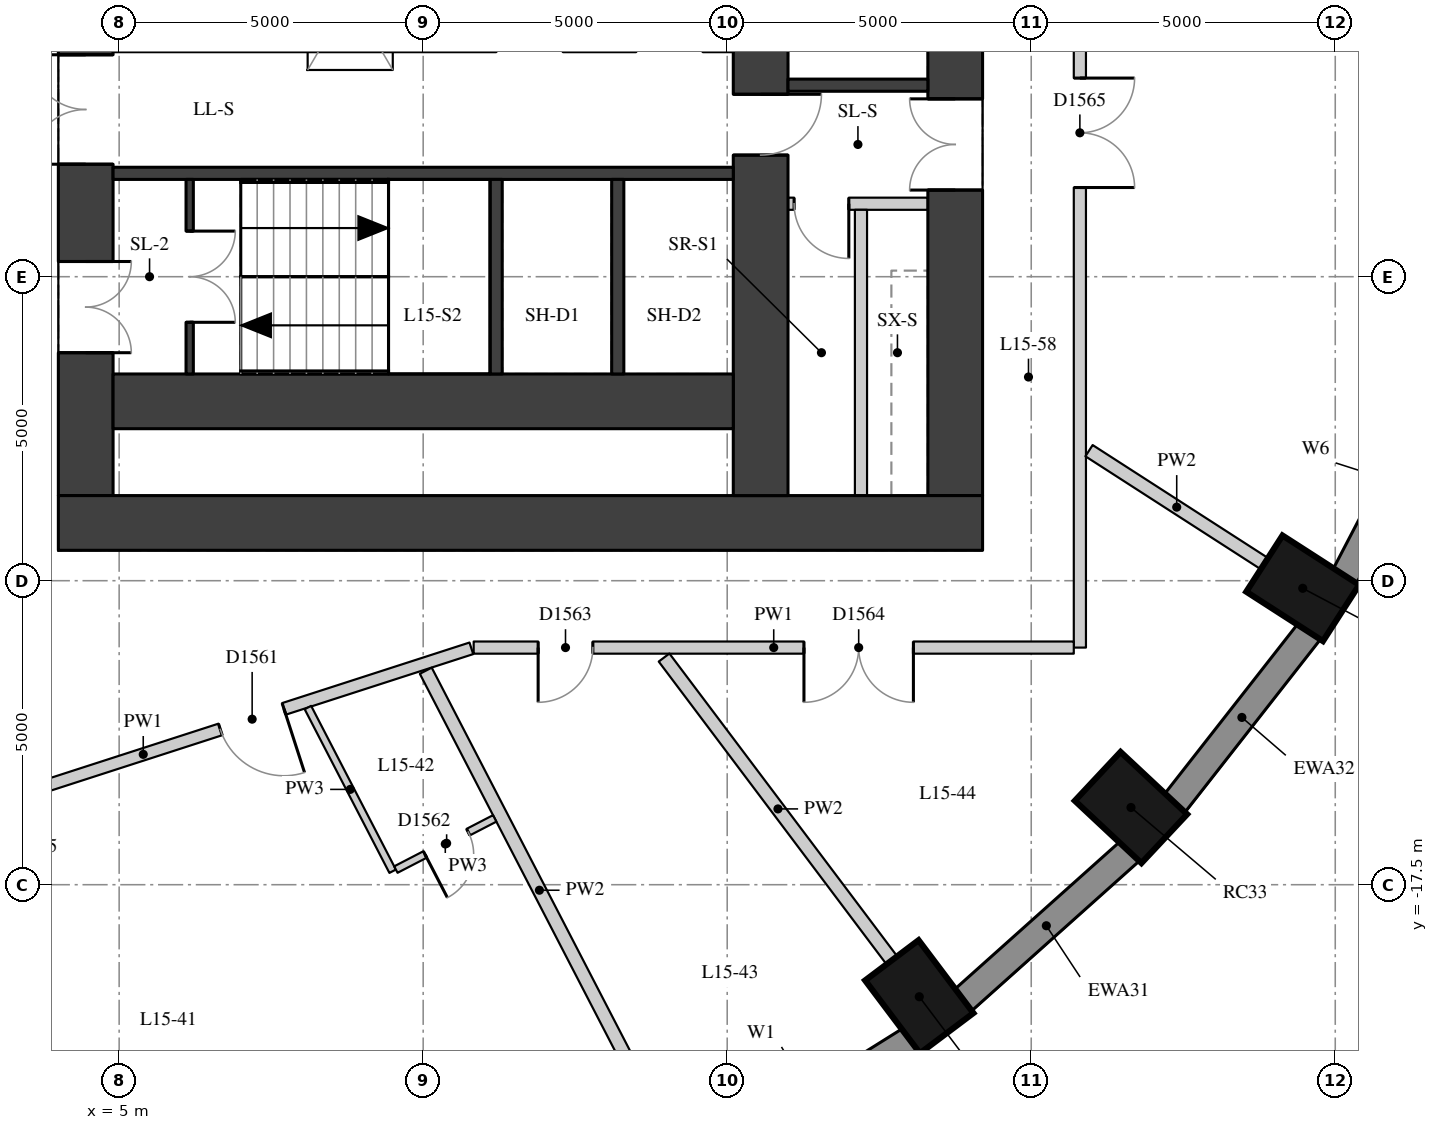
"""IFC4 building model, lengths in metres.
Left out: names, types, materials, properties, quantities, classifications, styles, units other than length and angle.
Written with IfcOpenShell. Run it as: python <this file> out.ifc"""

import sys

from ifc_helpers import new_model, si_unit, direction, frame, frame_2d, origin, origin_2d, place, context, subcontext, project, spatial, rectangle, extrude, element, fill, save


model = new_model("IFC4")
c1 = context("Model", 3, precision=1e-05, world=origin(), true_north=direction((0.0, 1.0)))
c2 = subcontext(c1, "Body", "Model", "MODEL_VIEW")
j1 = project(units=[si_unit("LENGTHUNIT", "METRE"), si_unit("PLANEANGLEUNIT", "RADIAN")], contexts=[c1])
p1 = place(None, origin())
s1 = spatial("IfcSite", under=j1, at=p1, CompositionType="ELEMENT")
p2 = place(p1, origin())
s2 = spatial("IfcBuilding", under=s1, at=p2, CompositionType="ELEMENT")
p3 = place(p2, frame((0.0, 0.0, 58.0)))
s3 = spatial("IfcBuildingStorey", under=s2, at=p3, CompositionType="ELEMENT", Elevation=58.0)
for number, where, z_axis, x_axis in (
    (1, (18.159, -19.343, 0.0), (0.0, 0.0, 1.0), (0.601, -0.799, 0.0)),
    (2, (21.641, -16.23, 0.0), (0.0, 0.0, 1.0), (0.73, -0.683, 0.0)),
    (3, (24.465, -12.625, 0.0), (0.0, 0.0, 1.0), (0.841, -0.541, 0.0)),
):
    element("IfcColumn", number, at=place(p3, frame(where, z_axis=z_axis, x_axis=x_axis)), inside=s3, PredefinedType="COLUMN", context=c2, shape_type="SweptSolid", body=[
        extrude(rectangle(XDim=1.5, YDim=1.1, at=origin_2d()), origin(), (0.0, 0.0, 1.0), 3.3),
    ])
p4 = place(p3, frame((14.817, -22.051, 0.0), z_axis=(0.0, 0.0, 1.0), x_axis=(0.847635480093, 0.530579016629, 0.0)))
e4 = element("IfcWall", 4, at=p4, inside=s3, PredefinedType="SOLIDWALL", context=c2, shape_type="SweptSolid", body=[
    extrude(rectangle(XDim=3.782, YDim=0.45, at=frame_2d((1.891, 0.0))), origin(), (0.0, 0.0, 1.0), 3.02),
])
p5 = place(p4, frame((0.791, 0.0, 0.4)))
e5 = element("IfcOpeningElement", 5, at=p5, cuts=e4, PredefinedType="OPENING", context=c2, shape_type="SweptSolid", body=[
    extrude(rectangle(XDim=2.2, YDim=1.75, at=frame_2d((1.1, 0.875))), frame((0.0, 0.235, 0.0), z_axis=(0.0, -1.0, 0.0), x_axis=(1.0, 0.0, 0.0)), (0.0, 0.0, 1.0), 0.47),
])
p6 = place(p3, frame((18.871, -19.407, 0.0), z_axis=(0.0, 0.0, 1.0), x_axis=(0.745526233716, 0.66647628228, 0.0)))
e6 = element("IfcWall", 6, at=p6, inside=s3, PredefinedType="SOLIDWALL", context=c2, shape_type="SweptSolid", body=[
    extrude(rectangle(XDim=3.697, YDim=0.45, at=frame_2d((1.848, 0.0))), origin(), (0.0, 0.0, 1.0), 3.02),
])
p7 = place(p3, frame((22.352, -16.17, 0.0), z_axis=(0.0, 0.0, 1.0), x_axis=(0.616661975264, 0.787228053529, 0.0)))
e7 = element("IfcWall", 7, at=p7, inside=s3, PredefinedType="SOLIDWALL", context=c2, shape_type="SweptSolid", body=[
    extrude(rectangle(XDim=3.61, YDim=0.45, at=frame_2d((1.805, 0.0))), origin(), (0.0, 0.0, 1.0), 3.02),
])
p8 = place(p3, frame((25.152, -12.437, 0.0), z_axis=(0.0, 0.0, 1.0), x_axis=(0.462492775226, 0.886623050041, 0.0)))
e8 = element("IfcWall", 8, at=p8, inside=s3, PredefinedType="SOLIDWALL", context=c2, shape_type="SweptSolid", body=[
    extrude(rectangle(XDim=3.532, YDim=0.45, at=frame_2d((1.766, 0.0))), origin(), (0.0, 0.0, 1.0), 3.02),
])
p9 = place(p8, frame((1.466, 0.0, 0.4)))
e9 = element("IfcOpeningElement", 9, at=p9, cuts=e8, PredefinedType="OPENING", context=c2, shape_type="SweptSolid", body=[
    extrude(rectangle(XDim=0.6, YDim=1.75, at=frame_2d((0.3, 0.875))), frame((0.0, 0.235, 0.0), z_axis=(0.0, -1.0, 0.0), x_axis=(1.0, 0.0, 0.0)), (0.0, 0.0, 1.0), 0.47),
])
p10 = place(p3, frame((4.45, -11.1, 0.0), z_axis=(0.0, 0.0, 1.0), x_axis=(0.0, 1.0, 0.0)))
e10 = element("IfcWall", 10, at=p10, inside=s3, PredefinedType="SHEAR", context=c2, shape_type="SweptSolid", body=[
    extrude(rectangle(XDim=22.2, YDim=0.9, at=frame_2d((11.1, 0.0))), origin(), (0.0, 0.0, 1.0), 3.02),
])
p11 = place(p10, frame((2.35, 0.0, 0.0)))
e11 = element("IfcOpeningElement", 11, at=p11, cuts=e10, PredefinedType="OPENING", context=c2, shape_type="SweptSolid", body=[
    extrude(rectangle(XDim=1.5, YDim=2.1, at=frame_2d((0.75, 1.05))), frame((0.0, 0.46, 0.0), z_axis=(0.0, -1.0, 0.0), x_axis=(1.0, 0.0, 0.0)), (0.0, 0.0, 1.0), 0.92),
])
p12 = place(p10, frame((5.45, 0.0, 0.0)))
e12 = element("IfcOpeningElement", 12, at=p12, cuts=e10, PredefinedType="OPENING", context=c2, shape_type="SweptSolid", body=[
    extrude(rectangle(XDim=1.8, YDim=2.1, at=frame_2d((0.9, 1.05))), frame((0.0, 0.46, 0.0), z_axis=(0.0, -1.0, 0.0), x_axis=(1.0, 0.0, 0.0)), (0.0, 0.0, 1.0), 0.92),
])
p13 = place(p10, frame((7.95, 0.0, 0.0)))
e13 = element("IfcOpeningElement", 13, at=p13, cuts=e10, PredefinedType="OPENING", context=c2, shape_type="SweptSolid", body=[
    extrude(rectangle(XDim=1.1, YDim=2.1, at=frame_2d((0.55, 1.05))), frame((0.0, 0.46, 0.0), z_axis=(0.0, -1.0, 0.0), x_axis=(1.0, 0.0, 0.0)), (0.0, 0.0, 1.0), 0.92),
])
p14 = place(p10, frame((10.6, 0.0, 0.0)))
e14 = element("IfcOpeningElement", 14, at=p14, cuts=e10, PredefinedType="OPENING", context=c2, shape_type="SweptSolid", body=[
    extrude(rectangle(XDim=1.0, YDim=2.1, at=frame_2d((0.5, 1.05))), frame((0.0, 0.46, 0.0), z_axis=(0.0, -1.0, 0.0), x_axis=(1.0, 0.0, 0.0)), (0.0, 0.0, 1.0), 0.92),
])
p15 = place(p10, frame((13.15, 0.0, 0.0)))
e15 = element("IfcOpeningElement", 15, at=p15, cuts=e10, PredefinedType="OPENING", context=c2, shape_type="SweptSolid", body=[
    extrude(rectangle(XDim=1.1, YDim=2.1, at=frame_2d((0.55, 1.05))), frame((0.0, 0.46, 0.0), z_axis=(0.0, -1.0, 0.0), x_axis=(1.0, 0.0, 0.0)), (0.0, 0.0, 1.0), 0.92),
])
p16 = place(p10, frame((14.95, 0.0, 0.0)))
e16 = element("IfcOpeningElement", 16, at=p16, cuts=e10, PredefinedType="OPENING", context=c2, shape_type="SweptSolid", body=[
    extrude(rectangle(XDim=1.8, YDim=2.1, at=frame_2d((0.9, 1.05))), frame((0.0, 0.46, 0.0), z_axis=(0.0, -1.0, 0.0), x_axis=(1.0, 0.0, 0.0)), (0.0, 0.0, 1.0), 0.92),
])
p17 = place(p10, frame((18.35, 0.0, 0.0)))
e17 = element("IfcOpeningElement", 17, at=p17, cuts=e10, PredefinedType="OPENING", context=c2, shape_type="SweptSolid", body=[
    extrude(rectangle(XDim=1.5, YDim=2.1, at=frame_2d((0.75, 1.05))), frame((0.0, 0.46, 0.0), z_axis=(0.0, -1.0, 0.0), x_axis=(1.0, 0.0, 0.0)), (0.0, 0.0, 1.0), 0.92),
])
p18 = place(p3, frame((18.75, -11.1, 0.0), z_axis=(0.0, 0.0, 1.0), x_axis=(0.0, 1.0, 0.0)))
e18 = element("IfcWall", 18, at=p18, inside=s3, PredefinedType="SHEAR", context=c2, shape_type="SweptSolid", body=[
    extrude(rectangle(XDim=22.2, YDim=0.9, at=frame_2d((11.1, 0.0))), origin(), (0.0, 0.0, 1.0), 3.02),
])
p19 = place(p18, frame((16.175, 0.0, 0.0)))
e19 = element("IfcOpeningElement", 19, at=p19, cuts=e18, PredefinedType="OPENING", context=c2, shape_type="SweptSolid", body=[
    extrude(rectangle(XDim=1.5, YDim=2.1, at=frame_2d((0.75, 1.05))), frame((0.0, 0.46, 0.0), z_axis=(0.0, -1.0, 0.0), x_axis=(1.0, 0.0, 0.0)), (0.0, 0.0, 1.0), 0.92),
])
p20 = place(p18, frame((5.025, 0.0, 0.0)))
e20 = element("IfcOpeningElement", 20, at=p20, cuts=e18, PredefinedType="OPENING", context=c2, shape_type="SweptSolid", body=[
    extrude(rectangle(XDim=1.5, YDim=2.1, at=frame_2d((0.75, 1.05))), frame((0.0, 0.46, 0.0), z_axis=(0.0, -1.0, 0.0), x_axis=(1.0, 0.0, 0.0)), (0.0, 0.0, 1.0), 0.92),
])
p21 = place(p3, frame((4.0, -11.55, 0.0), z_axis=(0.0, 0.0, 1.0), x_axis=(1.0, 0.0, 0.0)))
e21 = element("IfcWall", 21, at=p21, inside=s3, PredefinedType="SHEAR", context=c2, shape_type="SweptSolid", body=[
    extrude(rectangle(XDim=15.2, YDim=0.9, at=frame_2d((7.6, 0.0))), origin(), (0.0, 0.0, 1.0), 3.02),
])
p22 = place(p3, frame((15.55, -11.1, 0.0), z_axis=(0.0, 0.0, 1.0), x_axis=(0.0, 1.0, 0.0)))
e22 = element("IfcWall", 22, at=p22, inside=s3, PredefinedType="SHEAR", context=c2, shape_type="SweptSolid", body=[
    extrude(rectangle(XDim=22.2, YDim=0.9, at=frame_2d((11.1, 0.0))), origin(), (0.0, 0.0, 1.0), 3.02),
])
p23 = place(p22, frame((15.6, 0.0, 0.0)))
e23 = element("IfcOpeningElement", 23, at=p23, cuts=e22, PredefinedType="OPENING", context=c2, shape_type="SweptSolid", body=[
    extrude(rectangle(XDim=1.0, YDim=2.1, at=frame_2d((0.5, 1.05))), frame((0.0, 0.46, 0.0), z_axis=(0.0, -1.0, 0.0), x_axis=(1.0, 0.0, 0.0)), (0.0, 0.0, 1.0), 0.92),
])
p24 = place(p22, frame((5.6, 0.0, 0.0)))
e24 = element("IfcOpeningElement", 24, at=p24, cuts=e22, PredefinedType="OPENING", context=c2, shape_type="SweptSolid", body=[
    extrude(rectangle(XDim=1.0, YDim=2.1, at=frame_2d((0.5, 1.05))), frame((0.0, 0.46, 0.0), z_axis=(0.0, -1.0, 0.0), x_axis=(1.0, 0.0, 0.0)), (0.0, 0.0, 1.0), 0.92),
])
p25 = place(p3, frame((4.9, -9.55, 0.0), z_axis=(0.0, 0.0, 1.0), x_axis=(1.0, 0.0, 0.0)))
e25 = element("IfcWall", 25, at=p25, inside=s3, PredefinedType="SHEAR", context=c2, shape_type="SweptSolid", body=[
    extrude(rectangle(XDim=10.2, YDim=0.9, at=frame_2d((5.1, 0.0))), origin(), (0.0, 0.0, 1.0), 3.02),
])
p26 = place(p3, frame((4.9, -5.8, 0.0), z_axis=(0.0, 0.0, 1.0), x_axis=(1.0, 0.0, 0.0)))
e26 = element("IfcWall", 26, at=p26, inside=s3, PredefinedType="SHEAR", context=c2, shape_type="SweptSolid", body=[
    extrude(rectangle(XDim=10.2, YDim=0.2, at=frame_2d((5.1, 0.0))), origin(), (0.0, 0.0, 1.0), 3.02),
])
for number, where, z_axis, x_axis in (
    (27, (11.2, -9.1, 0.0), (0.0, 0.0, 1.0), (0.0, 1.0, 0.0)),
    (28, (13.2, -9.1, 0.0), (0.0, 0.0, 1.0), (0.0, 1.0, 0.0)),
):
    element("IfcWall", number, at=place(p3, frame(where, z_axis=z_axis, x_axis=x_axis)), inside=s3, PredefinedType="SHEAR", context=c2, shape_type="SweptSolid", body=[
        extrude(rectangle(XDim=3.2, YDim=0.2, at=frame_2d((1.6, 0.0))), origin(), (0.0, 0.0, 1.0), 3.02),
    ])
p27 = place(p3, frame((6.16, -9.1, 0.0), z_axis=(0.0, 0.0, 1.0), x_axis=(0.0, 1.0, 0.0)))
e29 = element("IfcWall", 29, at=p27, inside=s3, PredefinedType="SHEAR", context=c2, shape_type="SweptSolid", body=[
    extrude(rectangle(XDim=3.2, YDim=0.12, at=frame_2d((1.6, 0.0))), origin(), (0.0, 0.0, 1.0), 3.02),
])
p28 = place(p27, frame((0.85, 0.0, 0.0)))
e30 = element("IfcOpeningElement", 30, at=p28, cuts=e29, PredefinedType="OPENING", context=c2, shape_type="SweptSolid", body=[
    extrude(rectangle(XDim=1.5, YDim=2.1, at=frame_2d((0.75, 1.05))), frame((0.0, 0.07, 0.0), z_axis=(0.0, -1.0, 0.0), x_axis=(1.0, 0.0, 0.0)), (0.0, 0.0, 1.0), 0.14),
])
p29 = place(p3, frame((16.0, -4.35, 0.0), z_axis=(0.0, 0.0, 1.0), x_axis=(1.0, 0.0, 0.0)))
e31 = element("IfcWall", 31, at=p29, inside=s3, PredefinedType="SHEAR", context=c2, shape_type="SweptSolid", body=[
    extrude(rectangle(XDim=2.3, YDim=0.2, at=frame_2d((1.15, 0.0))), origin(), (0.0, 0.0, 1.0), 3.02),
])
p30 = place(p3, frame((16.0, -6.3, 0.0), z_axis=(0.0, 0.0, 1.0), x_axis=(1.0, 0.0, 0.0)))
e32 = element("IfcWall", 32, at=p30, inside=s3, PredefinedType="PARTITIONING", context=c2, shape_type="SweptSolid", body=[
    extrude(rectangle(XDim=2.3, YDim=0.2, at=frame_2d((1.15, 0.0))), origin(), (0.0, 0.0, 1.0), 3.02),
])
p31 = place(p30, frame((0.1, 0.0, 0.0)))
e33 = element("IfcOpeningElement", 33, at=p31, cuts=e32, PredefinedType="OPENING", context=c2, shape_type="SweptSolid", body=[
    extrude(rectangle(XDim=0.9, YDim=2.1, at=frame_2d((0.45, 1.05))), frame((0.0, 0.11, 0.0), z_axis=(0.0, -1.0, 0.0), x_axis=(1.0, 0.0, 0.0)), (0.0, 0.0, 1.0), 0.22),
])
p32 = place(p3, frame((17.2, -11.1, 0.0), z_axis=(0.0, 0.0, 1.0), x_axis=(0.0, 1.0, 0.0)))
e34 = element("IfcWall", 34, at=p32, inside=s3, PredefinedType="PARTITIONING", context=c2, shape_type="SweptSolid", body=[
    extrude(rectangle(XDim=4.7, YDim=0.2, at=frame_2d((2.35, 0.0))), origin(), (0.0, 0.0, 1.0), 3.02),
])
p33 = place(p3, frame((20.8, 13.5, 0.0), z_axis=(0.0, 0.0, 1.0), x_axis=(0.0, -1.0, 0.0)))
e35 = element("IfcWall", 35, at=p33, inside=s3, PredefinedType="PARTITIONING", context=c2, shape_type="SweptSolid", body=[
    extrude(rectangle(XDim=27.1, YDim=0.2, at=frame_2d((13.55, 0.0))), origin(), (0.0, 0.0, 1.0), 3.02),
])
p34 = place(p33, frame((17.733, 0.0, 0.0)))
e36 = element("IfcOpeningElement", 36, at=p34, cuts=e35, PredefinedType="OPENING", context=c2, shape_type="SweptSolid", body=[
    extrude(rectangle(XDim=1.8, YDim=2.1, at=frame_2d((0.9, 1.05))), frame((0.0, 0.11, 0.0), z_axis=(0.0, -1.0, 0.0), x_axis=(1.0, 0.0, 0.0)), (0.0, 0.0, 1.0), 0.22),
])
p35 = place(p33, frame((9.448, 0.0, 0.0)))
e37 = element("IfcOpeningElement", 37, at=p35, cuts=e35, PredefinedType="OPENING", context=c2, shape_type="SweptSolid", body=[
    extrude(rectangle(XDim=1.8, YDim=2.1, at=frame_2d((0.9, 1.05))), frame((0.0, 0.11, 0.0), z_axis=(0.0, -1.0, 0.0), x_axis=(1.0, 0.0, 0.0)), (0.0, 0.0, 1.0), 0.22),
])
p36 = place(p33, frame((2.704, 0.0, 0.0)))
e38 = element("IfcOpeningElement", 38, at=p36, cuts=e35, PredefinedType="OPENING", context=c2, shape_type="SweptSolid", body=[
    extrude(rectangle(XDim=1.8, YDim=2.1, at=frame_2d((0.9, 1.05))), frame((0.0, 0.11, 0.0), z_axis=(0.0, -1.0, 0.0), x_axis=(1.0, 0.0, 0.0)), (0.0, 0.0, 1.0), 0.22),
])
p37 = place(p3, frame((20.7, -13.6, 0.0), z_axis=(0.0, 0.0, 1.0), x_axis=(-1.0, 0.0, 0.0)))
e39 = element("IfcWall", 39, at=p37, inside=s3, PredefinedType="PARTITIONING", context=c2, shape_type="SweptSolid", body=[
    extrude(rectangle(XDim=9.87, YDim=0.2, at=frame_2d((4.935, 0.0))), origin(), (0.0, 0.0, 1.0), 3.02),
])
p38 = place(p37, frame((7.909, 0.0, 0.0)))
e40 = element("IfcOpeningElement", 40, at=p38, cuts=e39, PredefinedType="OPENING", context=c2, shape_type="SweptSolid", body=[
    extrude(rectangle(XDim=0.9, YDim=2.1, at=frame_2d((0.45, 1.05))), frame((0.0, 0.11, 0.0), z_axis=(0.0, -1.0, 0.0), x_axis=(1.0, 0.0, 0.0)), (0.0, 0.0, 1.0), 0.22),
])
p39 = place(p37, frame((2.638, 0.0, 0.0)))
e41 = element("IfcOpeningElement", 41, at=p39, cuts=e39, PredefinedType="OPENING", context=c2, shape_type="SweptSolid", body=[
    extrude(rectangle(XDim=1.8, YDim=2.1, at=frame_2d((0.9, 1.05))), frame((0.0, 0.11, 0.0), z_axis=(0.0, -1.0, 0.0), x_axis=(1.0, 0.0, 0.0)), (0.0, 0.0, 1.0), 0.22),
])
p40 = place(p3, frame((10.792, -13.612, 0.0), z_axis=(0.0, 0.0, 1.0), x_axis=(-0.951542928403, -0.307515943336, 0.0)))
e42 = element("IfcWall", 42, at=p40, inside=s3, PredefinedType="PARTITIONING", context=c2, shape_type="SweptSolid", body=[
    extrude(rectangle(XDim=11.342, YDim=0.2, at=frame_2d((5.671, 0.0))), origin(), (0.0, 0.0, 1.0), 3.02),
])
p41 = place(p40, frame((3.239, 0.0, 0.0)))
e43 = element("IfcOpeningElement", 43, at=p41, cuts=e42, PredefinedType="OPENING", context=c2, shape_type="SweptSolid", body=[
    extrude(rectangle(XDim=1.1, YDim=2.1, at=frame_2d((0.55, 1.05))), frame((0.0, 0.11, 0.0), z_axis=(0.0, -1.0, 0.0), x_axis=(1.0, 0.0, 0.0)), (0.0, 0.0, 1.0), 0.22),
])
p42 = place(p3, frame((13.78, -21.201, 0.0), z_axis=(0.0, 0.0, 1.0), x_axis=(-0.459685115008, 0.888081975405, 0.0)))
e44 = element("IfcWall", 44, at=p42, inside=s3, PredefinedType="PARTITIONING", context=c2, shape_type="SweptSolid", body=[
    extrude(rectangle(XDim=8.131, YDim=0.22, at=frame_2d((4.065, 0.0))), origin(), (0.0, 0.0, 1.0), 3.02),
])
p43 = place(p3, frame((17.708, -18.743, 0.0), z_axis=(0.0, 0.0, 1.0), x_axis=(-0.601177883261, 0.799115231164, 0.0)))
e45 = element("IfcWall", 45, at=p43, inside=s3, PredefinedType="PARTITIONING", context=c2, shape_type="SweptSolid", body=[
    extrude(rectangle(XDim=6.231, YDim=0.22, at=frame_2d((3.116, 0.0))), origin(), (0.0, 0.0, 1.0), 3.02),
])
p44 = place(p3, frame((23.835, -12.219, 0.0), z_axis=(0.0, 0.0, 1.0), x_axis=(-0.840694872373, 0.541509124176, 0.0)))
e46 = element("IfcWall", 46, at=p44, inside=s3, PredefinedType="PARTITIONING", context=c2, shape_type="SweptSolid", body=[
    extrude(rectangle(XDim=3.43, YDim=0.22, at=frame_2d((1.715, 0.0))), origin(), (0.0, 0.0, 1.0), 3.02),
])
p45 = place(p3, frame((8.104, -14.586, 0.0), z_axis=(0.0, 0.0, 1.0), x_axis=(0.459668270166, -0.888090694357, 0.0)))
e47 = element("IfcWall", 47, at=p45, inside=s3, PredefinedType="PARTITIONING", context=c2, shape_type="SweptSolid", body=[
    extrude(rectangle(XDim=3.032, YDim=0.12, at=frame_2d((1.516, 0.0))), origin(), (0.0, 0.0, 1.0), 3.02),
])
p46 = place(p3, frame((9.551, -17.251, 0.0), z_axis=(0.0, 0.0, 1.0), x_axis=(0.88806930088, 0.459709600546, 0.0)))
e48 = element("IfcWall", 48, at=p46, inside=s3, PredefinedType="PARTITIONING", context=c2, shape_type="SweptSolid", body=[
    extrude(rectangle(XDim=1.83, YDim=0.12, at=frame_2d((0.915, 0.0))), origin(), (0.0, 0.0, 1.0), 3.02),
])
p47 = place(p46, frame((0.54, 0.0, 0.0)))
e49 = element("IfcOpeningElement", 49, at=p47, cuts=e48, PredefinedType="OPENING", context=c2, shape_type="SweptSolid", body=[
    extrude(rectangle(XDim=0.8, YDim=2.1, at=frame_2d((0.4, 1.05))), frame((0.0, 0.07, 0.0), z_axis=(0.0, -1.0, 0.0), x_axis=(1.0, 0.0, 0.0)), (0.0, 0.0, 1.0), 0.14),
])
p48 = place(p11, origin())
e50 = element("IfcDoor", 50, at=p48, inside=s3, OperationType="DOUBLE_DOOR_SINGLE_SWING", PredefinedType="DOOR", context=c2, shape_type="SweptSolid", body=[
    extrude(rectangle(XDim=1.5, YDim=2.1, at=frame_2d((0.75, 1.05))), frame((0.0, 0.025, 0.0), z_axis=(0.0, -1.0, 0.0), x_axis=(1.0, 0.0, 0.0)), (0.0, 0.0, 1.0), 0.05),
])
fill(e11, e50)
p49 = place(p12, origin())
e51 = element("IfcDoor", 51, at=p49, inside=s3, OperationType="DOUBLE_DOOR_SINGLE_SWING", PredefinedType="DOOR", context=c2, shape_type="SweptSolid", body=[
    extrude(rectangle(XDim=1.8, YDim=2.1, at=frame_2d((0.9, 1.05))), frame((0.0, 0.025, 0.0), z_axis=(0.0, -1.0, 0.0), x_axis=(1.0, 0.0, 0.0)), (0.0, 0.0, 1.0), 0.05),
])
fill(e12, e51)
p50 = place(p20, origin())
e52 = element("IfcDoor", 52, at=p50, inside=s3, OperationType="DOUBLE_DOOR_SINGLE_SWING", PredefinedType="DOOR", context=c2, shape_type="SweptSolid", body=[
    extrude(rectangle(XDim=1.5, YDim=2.1, at=frame_2d((0.75, 1.05))), frame((0.0, 0.025, 0.0), z_axis=(0.0, -1.0, 0.0), x_axis=(1.0, 0.0, 0.0)), (0.0, 0.0, 1.0), 0.05),
])
fill(e20, e52)
p51 = place(p28, origin())
e53 = element("IfcDoor", 53, at=p51, inside=s3, OperationType="DOUBLE_DOOR_SINGLE_SWING", PredefinedType="DOOR", context=c2, shape_type="SweptSolid", body=[
    extrude(rectangle(XDim=1.5, YDim=2.1, at=frame_2d((0.75, 1.05))), frame((0.0, 0.025, 0.0), z_axis=(0.0, -1.0, 0.0), x_axis=(1.0, 0.0, 0.0)), (0.0, 0.0, 1.0), 0.05),
])
fill(e30, e53)
p52 = place(p24, origin())
e54 = element("IfcDoor", 54, at=p52, inside=s3, OperationType="SINGLE_SWING_LEFT", PredefinedType="DOOR", context=c2, shape_type="SweptSolid", body=[
    extrude(rectangle(XDim=1.0, YDim=2.1, at=frame_2d((0.5, 1.05))), frame((0.0, 0.025, 0.0), z_axis=(0.0, -1.0, 0.0), x_axis=(1.0, 0.0, 0.0)), (0.0, 0.0, 1.0), 0.05),
])
fill(e24, e54)
p53 = place(p31, origin())
e55 = element("IfcDoor", 55, at=p53, inside=s3, OperationType="SINGLE_SWING_LEFT", PredefinedType="DOOR", context=c2, shape_type="SweptSolid", body=[
    extrude(rectangle(XDim=0.9, YDim=2.1, at=frame_2d((0.45, 1.05))), frame((0.0, 0.025, 0.0), z_axis=(0.0, -1.0, 0.0), x_axis=(1.0, 0.0, 0.0)), (0.0, 0.0, 1.0), 0.05),
])
fill(e33, e55)
p54 = place(p41, origin())
e56 = element("IfcDoor", 56, at=p54, inside=s3, OperationType="SINGLE_SWING_LEFT", PredefinedType="DOOR", context=c2, shape_type="SweptSolid", body=[
    extrude(rectangle(XDim=1.1, YDim=2.1, at=frame_2d((0.55, 1.05))), frame((0.0, 0.025, 0.0), z_axis=(0.0, -1.0, 0.0), x_axis=(1.0, 0.0, 0.0)), (0.0, 0.0, 1.0), 0.05),
])
fill(e43, e56)
p55 = place(p47, origin())
e57 = element("IfcDoor", 57, at=p55, inside=s3, OperationType="SINGLE_SWING_RIGHT", PredefinedType="DOOR", context=c2, shape_type="SweptSolid", body=[
    extrude(rectangle(XDim=0.8, YDim=2.1, at=frame_2d((0.4, 1.05))), frame((0.0, 0.025, 0.0), z_axis=(0.0, -1.0, 0.0), x_axis=(1.0, 0.0, 0.0)), (0.0, 0.0, 1.0), 0.05),
])
fill(e49, e57)
p56 = place(p38, origin())
e58 = element("IfcDoor", 58, at=p56, inside=s3, OperationType="SINGLE_SWING_RIGHT", PredefinedType="DOOR", context=c2, shape_type="SweptSolid", body=[
    extrude(rectangle(XDim=0.9, YDim=2.1, at=frame_2d((0.45, 1.05))), frame((0.0, 0.025, 0.0), z_axis=(0.0, -1.0, 0.0), x_axis=(1.0, 0.0, 0.0)), (0.0, 0.0, 1.0), 0.05),
])
fill(e40, e58)
p57 = place(p39, origin())
e59 = element("IfcDoor", 59, at=p57, inside=s3, OperationType="DOUBLE_DOOR_SINGLE_SWING", PredefinedType="DOOR", context=c2, shape_type="SweptSolid", body=[
    extrude(rectangle(XDim=1.8, YDim=2.1, at=frame_2d((0.9, 1.05))), frame((0.0, 0.025, 0.0), z_axis=(0.0, -1.0, 0.0), x_axis=(1.0, 0.0, 0.0)), (0.0, 0.0, 1.0), 0.05),
])
fill(e41, e59)
p58 = place(p34, origin())
e60 = element("IfcDoor", 60, at=p58, inside=s3, OperationType="DOUBLE_DOOR_SINGLE_SWING", PredefinedType="DOOR", context=c2, shape_type="SweptSolid", body=[
    extrude(rectangle(XDim=1.8, YDim=2.1, at=frame_2d((0.9, 1.05))), frame((0.0, 0.025, 0.0), z_axis=(0.0, -1.0, 0.0), x_axis=(1.0, 0.0, 0.0)), (0.0, 0.0, 1.0), 0.05),
])
fill(e36, e60)
save(model, sys.argv[1])
